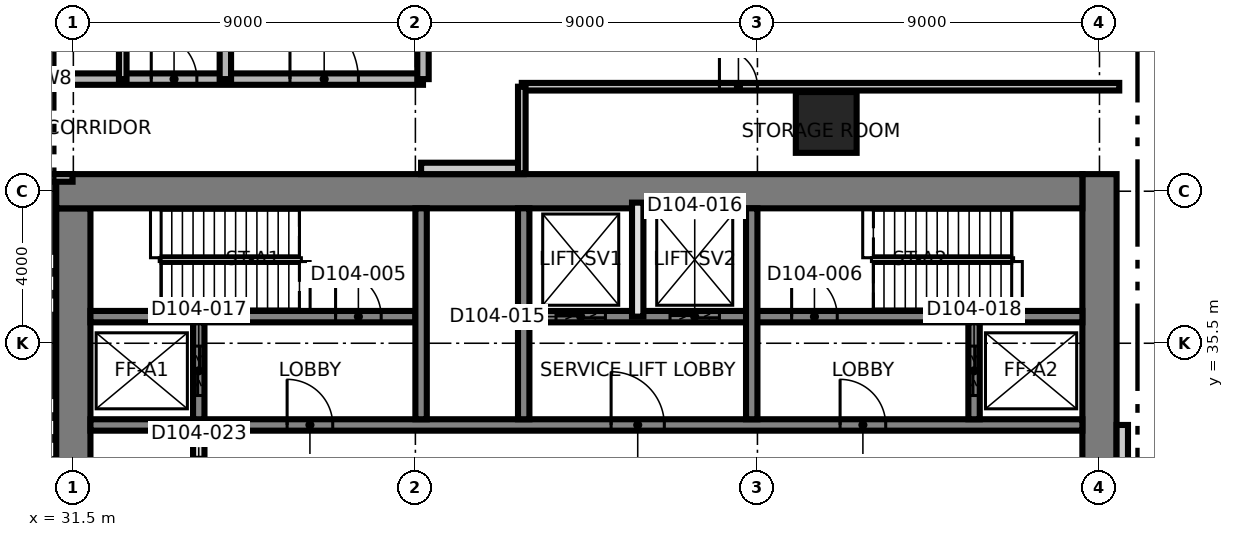
"""IFC4 building model, lengths in metres.
Left out: names, types, materials, properties, quantities, classifications, styles, units other than length and angle.
Written with IfcOpenShell. Run it as: python <this file> out.ifc"""

import sys

from ifc_helpers import new_model, si_unit, direction, frame, frame_2d, origin, origin_2d, place, context, subcontext, project, spatial, rectangle, extrude, element, fill, save


model = new_model("IFC4")
c1 = context("Model", 3, precision=1e-05, world=origin(), true_north=direction((0.0, 1.0)))
c2 = subcontext(c1, "Body", "Model", "MODEL_VIEW")
j1 = project(units=[si_unit("LENGTHUNIT", "METRE"), si_unit("PLANEANGLEUNIT", "RADIAN")], contexts=[c1])
p1 = place(None, origin())
s1 = spatial("IfcSite", under=j1, at=p1, CompositionType="ELEMENT")
p2 = place(p1, origin())
s2 = spatial("IfcBuilding", under=s1, at=p2, CompositionType="ELEMENT")
p3 = place(p2, frame((0.0, 0.0, 13.5)))
s3 = spatial("IfcBuildingStorey", under=s2, at=p3, CompositionType="ELEMENT", Elevation=13.5)
p4 = place(p3, frame((31.5, 21.95, 0.0), z_axis=(0.0, 0.0, 1.0), x_axis=(0.0, 1.0, 0.0)))
e1 = element("IfcWall", 1, at=p4, inside=s3, PredefinedType="SHEAR", context=c2, shape_type="SweptSolid", body=[
    extrude(rectangle(XDim=17.1, YDim=0.9, at=frame_2d((8.55, 0.0))), origin(), (0.0, 0.0, 1.0), 5.0),
])
p5 = place(p3, frame((58.5, 21.05, 0.0), z_axis=(0.0, 0.0, 1.0), x_axis=(0.0, 1.0, 0.0)))
e2 = element("IfcWall", 2, at=p5, inside=s3, PredefinedType="SHEAR", context=c2, shape_type="SweptSolid", body=[
    extrude(rectangle(XDim=18.9, YDim=0.9, at=frame_2d((9.45, 0.0))), origin(), (0.0, 0.0, 1.0), 5.0),
])
p6 = place(p3, frame((31.05, 39.5, 0.0), z_axis=(0.0, 0.0, 1.0), x_axis=(1.0, 0.0, 0.0)))
e3 = element("IfcWall", 3, at=p6, inside=s3, PredefinedType="SHEAR", context=c2, shape_type="SweptSolid", body=[
    extrude(rectangle(XDim=27.0, YDim=0.9, at=frame_2d((13.5, 0.0))), origin(), (0.0, 0.0, 1.0), 5.0),
])
p7 = place(p3, frame((31.95, 33.35, 0.0), z_axis=(0.0, 0.0, 1.0), x_axis=(1.0, 0.0, 0.0)))
e4 = element("IfcWall", 4, at=p7, inside=s3, PredefinedType="SHEAR", context=c2, shape_type="SweptSolid", body=[
    extrude(rectangle(XDim=26.1, YDim=0.3, at=frame_2d((13.05, 0.0))), origin(), (0.0, 0.0, 1.0), 5.0),
])
p8 = place(p7, frame((13.7, 0.0, 0.0)))
e5 = element("IfcOpeningElement", 5, at=p8, cuts=e4, PredefinedType="OPENING", context=c2, shape_type="SweptSolid", body=[
    extrude(rectangle(XDim=1.4, YDim=2.1, at=frame_2d((0.7, 1.05))), frame((0.0, 0.16, 0.0), z_axis=(0.0, -1.0, 0.0), x_axis=(1.0, 0.0, 0.0)), (0.0, 0.0, 1.0), 0.32),
])
p9 = place(p7, frame((5.175, 0.0, 0.0)))
e6 = element("IfcOpeningElement", 6, at=p9, cuts=e4, PredefinedType="OPENING", context=c2, shape_type="SweptSolid", body=[
    extrude(rectangle(XDim=1.2, YDim=2.1, at=frame_2d((0.6, 1.05))), frame((0.0, 0.16, 0.0), z_axis=(0.0, -1.0, 0.0), x_axis=(1.0, 0.0, 0.0)), (0.0, 0.0, 1.0), 0.32),
])
p10 = place(p7, frame((19.725, 0.0, 0.0)))
e7 = element("IfcOpeningElement", 7, at=p10, cuts=e4, PredefinedType="OPENING", context=c2, shape_type="SweptSolid", body=[
    extrude(rectangle(XDim=1.2, YDim=2.1, at=frame_2d((0.6, 1.05))), frame((0.0, 0.16, 0.0), z_axis=(0.0, -1.0, 0.0), x_axis=(1.0, 0.0, 0.0)), (0.0, 0.0, 1.0), 0.32),
])
p11 = place(p3, frame((31.95, 36.2, 0.0), z_axis=(0.0, 0.0, 1.0), x_axis=(1.0, 0.0, 0.0)))
e8 = element("IfcWall", 8, at=p11, inside=s3, PredefinedType="SHEAR", context=c2, shape_type="SweptSolid", body=[
    extrude(rectangle(XDim=8.55, YDim=0.3, at=frame_2d((4.275, 0.0))), origin(), (0.0, 0.0, 1.0), 5.0),
])
p12 = place(p11, frame((6.45, 0.0, 0.0)))
e9 = element("IfcOpeningElement", 9, at=p12, cuts=e8, PredefinedType="OPENING", context=c2, shape_type="SweptSolid", body=[
    extrude(rectangle(XDim=1.2, YDim=2.1, at=frame_2d((0.6, 1.05))), frame((0.0, 0.16, 0.0), z_axis=(0.0, -1.0, 0.0), x_axis=(1.0, 0.0, 0.0)), (0.0, 0.0, 1.0), 0.32),
])
p13 = place(p3, frame((43.5, 36.2, 0.0), z_axis=(0.0, 0.0, 1.0), x_axis=(1.0, 0.0, 0.0)))
e10 = element("IfcWall", 10, at=p13, inside=s3, PredefinedType="SHEAR", context=c2, shape_type="SweptSolid", body=[
    extrude(rectangle(XDim=14.55, YDim=0.3, at=frame_2d((7.275, 0.0))), origin(), (0.0, 0.0, 1.0), 5.0),
])
p14 = place(p13, frame((6.9, 0.0, 0.0)))
e11 = element("IfcOpeningElement", 11, at=p14, cuts=e10, PredefinedType="OPENING", context=c2, shape_type="SweptSolid", body=[
    extrude(rectangle(XDim=1.2, YDim=2.1, at=frame_2d((0.6, 1.05))), frame((0.0, 0.16, 0.0), z_axis=(0.0, -1.0, 0.0), x_axis=(1.0, 0.0, 0.0)), (0.0, 0.0, 1.0), 0.32),
])
p15 = place(p13, frame((0.7, 0.0, 0.0)))
e12 = element("IfcOpeningElement", 12, at=p15, cuts=e10, PredefinedType="OPENING", context=c2, shape_type="SweptSolid", body=[
    extrude(rectangle(XDim=1.3, YDim=2.4, at=frame_2d((0.65, 1.2))), frame((0.0, 0.16, 0.0), z_axis=(0.0, -1.0, 0.0), x_axis=(1.0, 0.0, 0.0)), (0.0, 0.0, 1.0), 0.32),
])
p16 = place(p13, frame((3.7, 0.0, 0.0)))
e13 = element("IfcOpeningElement", 13, at=p16, cuts=e10, PredefinedType="OPENING", context=c2, shape_type="SweptSolid", body=[
    extrude(rectangle(XDim=1.3, YDim=2.4, at=frame_2d((0.65, 1.2))), frame((0.0, 0.16, 0.0), z_axis=(0.0, -1.0, 0.0), x_axis=(1.0, 0.0, 0.0)), (0.0, 0.0, 1.0), 0.32),
])
for number, where, z_axis, x_axis in (
    (14, (40.65, 33.5, 0.0), (0.0, 0.0, 1.0), (0.0, 1.0, 0.0)),
    (15, (43.35, 33.5, 0.0), (0.0, 0.0, 1.0), (0.0, 1.0, 0.0)),
):
    element("IfcWall", number, at=place(p3, frame(where, z_axis=z_axis, x_axis=x_axis)), inside=s3, PredefinedType="SHEAR", context=c2, shape_type="SweptSolid", body=[
        extrude(rectangle(XDim=5.55, YDim=0.3, at=frame_2d((2.775, 0.0))), origin(), (0.0, 0.0, 1.0), 5.0),
    ])
p17 = place(p3, frame((34.8, 33.5, 0.0), z_axis=(0.0, 0.0, 1.0), x_axis=(0.0, 1.0, 0.0)))
e16 = element("IfcWall", 16, at=p17, inside=s3, PredefinedType="SHEAR", context=c2, shape_type="SweptSolid", body=[
    extrude(rectangle(XDim=2.55, YDim=0.3, at=frame_2d((1.275, 0.0))), origin(), (0.0, 0.0, 1.0), 5.0),
])
p18 = place(p17, frame((0.625, 0.0, 0.0)))
e17 = element("IfcOpeningElement", 17, at=p18, cuts=e16, PredefinedType="OPENING", context=c2, shape_type="SweptSolid", body=[
    extrude(rectangle(XDim=1.3, YDim=2.4, at=frame_2d((0.65, 1.2))), frame((0.0, 0.16, 0.0), z_axis=(0.0, -1.0, 0.0), x_axis=(1.0, 0.0, 0.0)), (0.0, 0.0, 1.0), 0.32),
])
p19 = place(p3, frame((49.35, 33.5, 0.0), z_axis=(0.0, 0.0, 1.0), x_axis=(0.0, 1.0, 0.0)))
e18 = element("IfcWall", 18, at=p19, inside=s3, PredefinedType="SHEAR", context=c2, shape_type="SweptSolid", body=[
    extrude(rectangle(XDim=5.55, YDim=0.3, at=frame_2d((2.775, 0.0))), origin(), (0.0, 0.0, 1.0), 5.0),
])
p20 = place(p3, frame((55.2, 33.5, 0.0), z_axis=(0.0, 0.0, 1.0), x_axis=(0.0, 1.0, 0.0)))
e19 = element("IfcWall", 19, at=p20, inside=s3, PredefinedType="SHEAR", context=c2, shape_type="SweptSolid", body=[
    extrude(rectangle(XDim=2.55, YDim=0.3, at=frame_2d((1.275, 0.0))), origin(), (0.0, 0.0, 1.0), 5.0),
])
p21 = place(p20, frame((0.625, 0.0, 0.0)))
e20 = element("IfcOpeningElement", 20, at=p21, cuts=e19, PredefinedType="OPENING", context=c2, shape_type="SweptSolid", body=[
    extrude(rectangle(XDim=1.3, YDim=2.4, at=frame_2d((0.65, 1.2))), frame((0.0, 0.16, 0.0), z_axis=(0.0, -1.0, 0.0), x_axis=(1.0, 0.0, 0.0)), (0.0, 0.0, 1.0), 0.32),
])
p22 = place(p3, frame((51.31, 41.31, 0.0), z_axis=(0.0, 0.0, 1.0), x_axis=(1.0, 0.0, 0.0)))
e21 = element("IfcColumn", 21, at=p22, inside=s3, PredefinedType="COLUMN", context=c2, shape_type="SweptSolid", body=[
    extrude(rectangle(XDim=1.6, YDim=1.6, at=origin_2d()), origin(), (0.0, 0.0, 1.0), 5.0),
])
p23 = place(p3, frame((40.65, 40.1, 0.0), z_axis=(0.0, 0.0, 1.0), x_axis=(1.0, 0.0, 0.0)))
e22 = element("IfcWall", 22, at=p23, inside=s3, PredefinedType="PARTITIONING", context=c2, shape_type="SweptSolid", body=[
    extrude(rectangle(XDim=2.7, YDim=0.3, at=frame_2d((1.35, 0.0))), origin(), (0.0, 0.0, 1.0), 4.7),
])
p24 = place(p3, frame((34.8, 27.9, 0.0), z_axis=(0.0, 0.0, 1.0), x_axis=(0.0, 1.0, 0.0)))
e23 = element("IfcWall", 23, at=p24, inside=s3, PredefinedType="SOLIDWALL", context=c2, shape_type="SweptSolid", body=[
    extrude(rectangle(XDim=5.45, YDim=0.3, at=frame_2d((2.725, 0.0))), origin(), (0.0, 0.0, 1.0), 4.7),
])
p25 = place(p24, frame((3.6, 0.0, 0.0)))
e24 = element("IfcOpeningElement", 24, at=p25, cuts=e23, PredefinedType="OPENING", context=c2, shape_type="SweptSolid", body=[
    extrude(rectangle(XDim=1.0, YDim=2.1, at=frame_2d((0.5, 1.05))), frame((0.0, 0.16, 0.0), z_axis=(0.0, -1.0, 0.0), x_axis=(1.0, 0.0, 0.0)), (0.0, 0.0, 1.0), 0.32),
])
p26 = place(p3, frame((46.35, 36.2, 0.0), z_axis=(0.0, 0.0, 1.0), x_axis=(0.0, 1.0, 0.0)))
e25 = element("IfcWall", 25, at=p26, inside=s3, PredefinedType="SOLIDWALL", context=c2, shape_type="SweptSolid", body=[
    extrude(rectangle(XDim=3.0, YDim=0.3, at=frame_2d((1.5, 0.0))), origin(), (0.0, 0.0, 1.0), 4.7),
])
p27 = place(p3, frame((59.1, 30.65, 0.0), z_axis=(0.0, 0.0, 1.0), x_axis=(0.0, 1.0, 0.0)))
e26 = element("IfcWall", 26, at=p27, inside=s3, PredefinedType="PARTITIONING", context=c2, shape_type="SweptSolid", body=[
    extrude(rectangle(XDim=2.7, YDim=0.3, at=frame_2d((1.35, 0.0))), origin(), (0.0, 0.0, 1.0), 4.7),
])
p28 = place(p3, frame((21.07, 39.85, 0.0), z_axis=(0.0, 0.0, 1.0), x_axis=(1.0, 0.0, 0.0)))
e27 = element("IfcWall", 27, at=p28, inside=s3, PredefinedType="PARTITIONING", context=c2, shape_type="SweptSolid", body=[
    extrude(rectangle(XDim=10.41, YDim=0.2, at=frame_2d((5.205, 0.0))), origin(), (0.0, 0.0, 1.0), 4.7),
])
p29 = place(p28, frame((4.557, 0.0, 0.0)))
e28 = element("IfcOpeningElement", 28, at=p29, cuts=e27, PredefinedType="OPENING", context=c2, shape_type="SweptSolid", body=[
    extrude(rectangle(XDim=1.0, YDim=2.1, at=frame_2d((0.5, 1.05))), frame((0.0, 0.11, 0.0), z_axis=(0.0, -1.0, 0.0), x_axis=(1.0, 0.0, 0.0)), (0.0, 0.0, 1.0), 0.22),
])
p30 = place(p3, frame((43.3, 42.25, 0.0), z_axis=(0.0, 0.0, 1.0), x_axis=(1.0, 0.0, 0.0)))
e29 = element("IfcWall", 29, at=p30, inside=s3, PredefinedType="PARTITIONING", context=c2, shape_type="SweptSolid", body=[
    extrude(rectangle(XDim=15.72, YDim=0.2, at=frame_2d((7.86, 0.0))), origin(), (0.0, 0.0, 1.0), 4.7),
])
p31 = place(p30, frame((5.2, 0.0, 0.0)))
e30 = element("IfcOpeningElement", 30, at=p31, cuts=e29, PredefinedType="OPENING", context=c2, shape_type="SweptSolid", body=[
    extrude(rectangle(XDim=1.0, YDim=2.1, at=frame_2d((0.5, 1.05))), frame((0.0, 0.11, 0.0), z_axis=(0.0, -1.0, 0.0), x_axis=(1.0, 0.0, 0.0)), (0.0, 0.0, 1.0), 0.22),
])
p32 = place(p3, frame((21.07, 42.45, 0.0), z_axis=(0.0, 0.0, 1.0), x_axis=(1.0, 0.0, 0.0)))
e31 = element("IfcWall", 31, at=p32, inside=s3, PredefinedType="SHEAR", context=c2, shape_type="SweptSolid", body=[
    extrude(rectangle(XDim=19.63, YDim=0.3, at=frame_2d((9.815, 0.0))), origin(), (0.0, 0.0, 1.0), 4.7),
])
p33 = place(p32, frame((16.13, 0.0, 0.0)))
e32 = element("IfcOpeningElement", 32, at=p33, cuts=e31, PredefinedType="OPENING", context=c2, shape_type="SweptSolid", body=[
    extrude(rectangle(XDim=1.8, YDim=2.1, at=frame_2d((0.9, 1.05))), frame((0.0, 0.16, 0.0), z_axis=(0.0, -1.0, 0.0), x_axis=(1.0, 0.0, 0.0)), (0.0, 0.0, 1.0), 0.32),
])
p34 = place(p32, frame((12.48, 0.0, 0.0)))
e33 = element("IfcOpeningElement", 33, at=p34, cuts=e31, PredefinedType="OPENING", context=c2, shape_type="SweptSolid", body=[
    extrude(rectangle(XDim=1.2, YDim=2.1, at=frame_2d((0.6, 1.05))), frame((0.0, 0.16, 0.0), z_axis=(0.0, -1.0, 0.0), x_axis=(1.0, 0.0, 0.0)), (0.0, 0.0, 1.0), 0.32),
])
p35 = place(p3, frame((32.8, 42.45, 0.0), z_axis=(0.0, 0.0, 1.0), x_axis=(0.0, 1.0, 0.0)))
e34 = element("IfcWall", 34, at=p35, inside=s3, PredefinedType="PARTITIONING", context=c2, shape_type="SweptSolid", body=[
    extrude(rectangle(XDim=20.6, YDim=0.2, at=frame_2d((10.3, 0.0))), origin(), (0.0, 0.0, 1.0), 4.7),
])
p36 = place(p35, frame((7.05, 0.0, 0.0)))
e35 = element("IfcOpeningElement", 35, at=p36, cuts=e34, PredefinedType="OPENING", context=c2, shape_type="SweptSolid", body=[
    extrude(rectangle(XDim=1.0, YDim=2.1, at=frame_2d((0.5, 1.05))), frame((0.0, 0.11, 0.0), z_axis=(0.0, -1.0, 0.0), x_axis=(1.0, 0.0, 0.0)), (0.0, 0.0, 1.0), 0.22),
])
p37 = place(p35, frame((16.05, 0.0, 0.0)))
e36 = element("IfcOpeningElement", 36, at=p37, cuts=e34, PredefinedType="OPENING", context=c2, shape_type="SweptSolid", body=[
    extrude(rectangle(XDim=1.0, YDim=2.1, at=frame_2d((0.5, 1.05))), frame((0.0, 0.11, 0.0), z_axis=(0.0, -1.0, 0.0), x_axis=(1.0, 0.0, 0.0)), (0.0, 0.0, 1.0), 0.22),
])
p38 = place(p3, frame((35.5, 42.45, 0.0), z_axis=(0.0, 0.0, 1.0), x_axis=(0.0, 1.0, 0.0)))
e37 = element("IfcWall", 37, at=p38, inside=s3, PredefinedType="SHEAR", context=c2, shape_type="SweptSolid", body=[
    extrude(rectangle(XDim=20.6, YDim=0.3, at=frame_2d((10.3, 0.0))), origin(), (0.0, 0.0, 1.0), 4.7),
])
p39 = place(p3, frame((40.7, 42.45, 0.0), z_axis=(0.0, 0.0, 1.0), x_axis=(0.0, 1.0, 0.0)))
e38 = element("IfcWall", 38, at=p39, inside=s3, PredefinedType="SHEAR", context=c2, shape_type="SweptSolid", body=[
    extrude(rectangle(XDim=20.7, YDim=0.3, at=frame_2d((10.35, 0.0))), origin(), (0.0, 0.0, 1.0), 4.7),
])
p40 = place(p39, frame((9.71, 0.0, 0.0)))
e39 = element("IfcOpeningElement", 39, at=p40, cuts=e38, PredefinedType="OPENING", context=c2, shape_type="SweptSolid", body=[
    extrude(rectangle(XDim=1.0, YDim=2.1, at=frame_2d((0.5, 1.05))), frame((0.0, 0.16, 0.0), z_axis=(0.0, -1.0, 0.0), x_axis=(1.0, 0.0, 0.0)), (0.0, 0.0, 1.0), 0.32),
])
p41 = place(p39, frame((12.673, 0.0, 0.0)))
e40 = element("IfcOpeningElement", 40, at=p41, cuts=e38, PredefinedType="OPENING", context=c2, shape_type="SweptSolid", body=[
    extrude(rectangle(XDim=1.0, YDim=2.1, at=frame_2d((0.5, 1.05))), frame((0.0, 0.16, 0.0), z_axis=(0.0, -1.0, 0.0), x_axis=(1.0, 0.0, 0.0)), (0.0, 0.0, 1.0), 0.32),
])
p42 = place(p39, frame((16.05, 0.0, 0.0)))
e41 = element("IfcOpeningElement", 41, at=p42, cuts=e38, PredefinedType="OPENING", context=c2, shape_type="SweptSolid", body=[
    extrude(rectangle(XDim=1.1, YDim=2.1, at=frame_2d((0.55, 1.05))), frame((0.0, 0.16, 0.0), z_axis=(0.0, -1.0, 0.0), x_axis=(1.0, 0.0, 0.0)), (0.0, 0.0, 1.0), 0.32),
])
p43 = place(p39, frame((18.694, 0.0, 0.0)))
e42 = element("IfcOpeningElement", 42, at=p43, cuts=e38, PredefinedType="OPENING", context=c2, shape_type="SweptSolid", body=[
    extrude(rectangle(XDim=1.0, YDim=2.1, at=frame_2d((0.5, 1.05))), frame((0.0, 0.16, 0.0), z_axis=(0.0, -1.0, 0.0), x_axis=(1.0, 0.0, 0.0)), (0.0, 0.0, 1.0), 0.32),
])
p44 = place(p3, frame((43.3, 39.97, 0.0), z_axis=(0.0, 0.0, 1.0), x_axis=(0.0, 1.0, 0.0)))
e43 = element("IfcWall", 43, at=p44, inside=s3, PredefinedType="PARTITIONING", context=c2, shape_type="SweptSolid", body=[
    extrude(rectangle(XDim=2.28, YDim=0.2, at=frame_2d((1.14, 0.0))), origin(), (0.0, 0.0, 1.0), 4.7),
])
p45 = place(p8, origin())
e44 = element("IfcDoor", 44, at=p45, inside=s3, OperationType="SINGLE_SWING_RIGHT", PredefinedType="DOOR", context=c2, shape_type="SweptSolid", body=[
    extrude(rectangle(XDim=1.4, YDim=2.1, at=frame_2d((0.7, 1.05))), frame((0.0, 0.025, 0.0), z_axis=(0.0, -1.0, 0.0), x_axis=(1.0, 0.0, 0.0)), (0.0, 0.0, 1.0), 0.05),
])
fill(e5, e44)
p46 = place(p9, origin())
e45 = element("IfcDoor", 45, at=p46, inside=s3, OperationType="SINGLE_SWING_LEFT", PredefinedType="DOOR", context=c2, shape_type="SweptSolid", body=[
    extrude(rectangle(XDim=1.2, YDim=2.1, at=frame_2d((0.6, 1.05))), frame((0.0, 0.025, 0.0), z_axis=(0.0, -1.0, 0.0), x_axis=(1.0, 0.0, 0.0)), (0.0, 0.0, 1.0), 0.05),
])
fill(e6, e45)
p47 = place(p10, origin())
e46 = element("IfcDoor", 46, at=p47, inside=s3, OperationType="SINGLE_SWING_RIGHT", PredefinedType="DOOR", context=c2, shape_type="SweptSolid", body=[
    extrude(rectangle(XDim=1.2, YDim=2.1, at=frame_2d((0.6, 1.05))), frame((0.0, 0.025, 0.0), z_axis=(0.0, -1.0, 0.0), x_axis=(1.0, 0.0, 0.0)), (0.0, 0.0, 1.0), 0.05),
])
fill(e7, e46)
p48 = place(p12, origin())
e47 = element("IfcDoor", 47, at=p48, inside=s3, OperationType="SINGLE_SWING_RIGHT", PredefinedType="DOOR", context=c2, shape_type="SweptSolid", body=[
    extrude(rectangle(XDim=1.2, YDim=2.1, at=frame_2d((0.6, 1.05))), frame((0.0, 0.025, 0.0), z_axis=(0.0, -1.0, 0.0), x_axis=(1.0, 0.0, 0.0)), (0.0, 0.0, 1.0), 0.05),
])
fill(e9, e47)
p49 = place(p14, origin())
e48 = element("IfcDoor", 48, at=p49, inside=s3, OperationType="SINGLE_SWING_LEFT", PredefinedType="DOOR", context=c2, shape_type="SweptSolid", body=[
    extrude(rectangle(XDim=1.2, YDim=2.1, at=frame_2d((0.6, 1.05))), frame((0.0, 0.025, 0.0), z_axis=(0.0, -1.0, 0.0), x_axis=(1.0, 0.0, 0.0)), (0.0, 0.0, 1.0), 0.05),
])
fill(e11, e48)
p50 = place(p15, origin())
e49 = element("IfcDoor", 49, at=p50, inside=s3, OperationType="SLIDING_TO_LEFT", PredefinedType="DOOR", context=c2, shape_type="SweptSolid", body=[
    extrude(rectangle(XDim=1.3, YDim=2.4, at=frame_2d((0.65, 1.2))), frame((0.0, 0.025, 0.0), z_axis=(0.0, -1.0, 0.0), x_axis=(1.0, 0.0, 0.0)), (0.0, 0.0, 1.0), 0.05),
])
fill(e12, e49)
p51 = place(p16, origin())
e50 = element("IfcDoor", 50, at=p51, inside=s3, OperationType="SLIDING_TO_LEFT", PredefinedType="DOOR", context=c2, shape_type="SweptSolid", body=[
    extrude(rectangle(XDim=1.3, YDim=2.4, at=frame_2d((0.65, 1.2))), frame((0.0, 0.025, 0.0), z_axis=(0.0, -1.0, 0.0), x_axis=(1.0, 0.0, 0.0)), (0.0, 0.0, 1.0), 0.05),
])
fill(e13, e50)
p52 = place(p18, origin())
e51 = element("IfcDoor", 51, at=p52, inside=s3, OperationType="SLIDING_TO_LEFT", PredefinedType="DOOR", context=c2, shape_type="SweptSolid", body=[
    extrude(rectangle(XDim=1.3, YDim=2.4, at=frame_2d((0.65, 1.2))), frame((0.0, 0.025, 0.0), z_axis=(0.0, -1.0, 0.0), x_axis=(1.0, 0.0, 0.0)), (0.0, 0.0, 1.0), 0.05),
])
fill(e17, e51)
p53 = place(p21, origin())
e52 = element("IfcDoor", 52, at=p53, inside=s3, OperationType="SLIDING_TO_LEFT", PredefinedType="DOOR", context=c2, shape_type="SweptSolid", body=[
    extrude(rectangle(XDim=1.3, YDim=2.4, at=frame_2d((0.65, 1.2))), frame((0.0, 0.025, 0.0), z_axis=(0.0, -1.0, 0.0), x_axis=(1.0, 0.0, 0.0)), (0.0, 0.0, 1.0), 0.05),
])
fill(e20, e52)
p54 = place(p33, origin())
e53 = element("IfcDoor", 53, at=p54, inside=s3, OperationType="SINGLE_SWING_RIGHT", PredefinedType="DOOR", context=c2, shape_type="SweptSolid", body=[
    extrude(rectangle(XDim=1.8, YDim=2.1, at=frame_2d((0.9, 1.05))), frame((0.0, 0.025, 0.0), z_axis=(0.0, -1.0, 0.0), x_axis=(1.0, 0.0, 0.0)), (0.0, 0.0, 1.0), 0.05),
])
fill(e32, e53)
p55 = place(p34, origin())
e54 = element("IfcDoor", 54, at=p55, inside=s3, OperationType="SINGLE_SWING_LEFT", PredefinedType="DOOR", context=c2, shape_type="SweptSolid", body=[
    extrude(rectangle(XDim=1.2, YDim=2.1, at=frame_2d((0.6, 1.05))), frame((0.0, 0.025, 0.0), z_axis=(0.0, -1.0, 0.0), x_axis=(1.0, 0.0, 0.0)), (0.0, 0.0, 1.0), 0.05),
])
fill(e33, e54)
p56 = place(p31, origin())
e55 = element("IfcDoor", 55, at=p56, inside=s3, OperationType="SINGLE_SWING_RIGHT", PredefinedType="DOOR", context=c2, shape_type="SweptSolid", body=[
    extrude(rectangle(XDim=1.0, YDim=2.1, at=frame_2d((0.5, 1.05))), frame((0.0, 0.025, 0.0), z_axis=(0.0, -1.0, 0.0), x_axis=(1.0, 0.0, 0.0)), (0.0, 0.0, 1.0), 0.05),
])
fill(e30, e55)
save(model, sys.argv[1])
